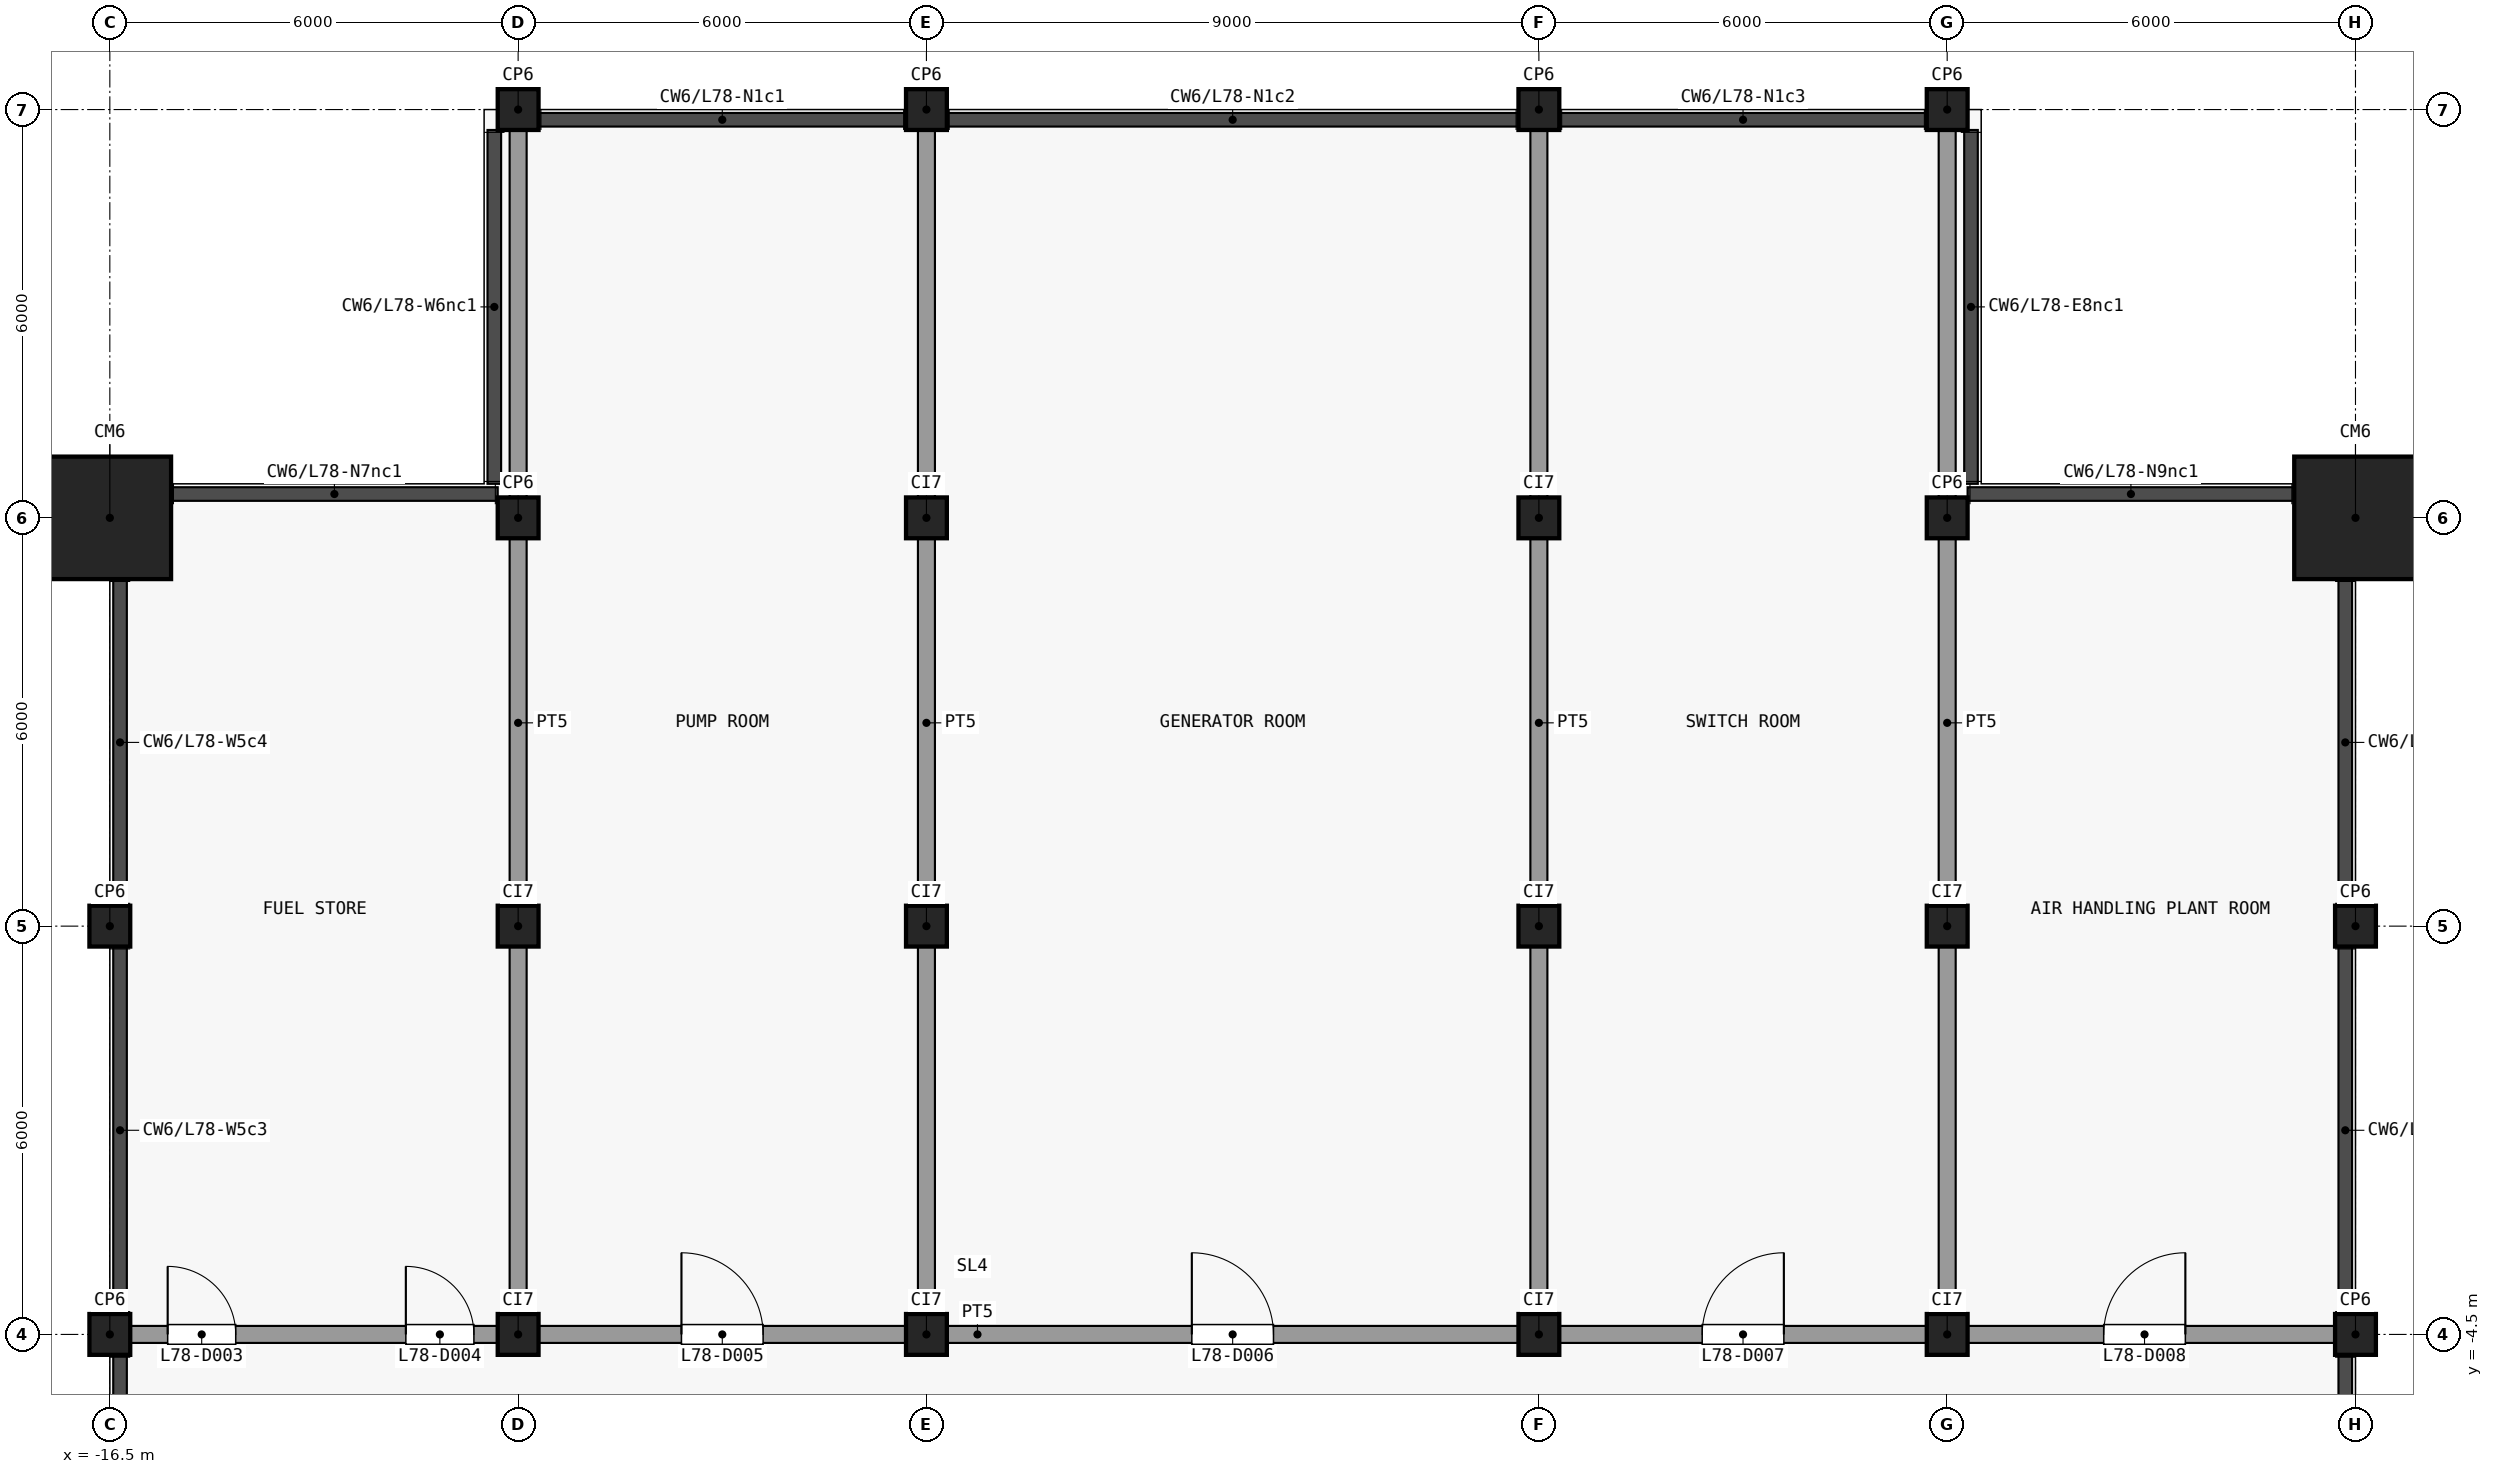
"""IFC4 building model, lengths in metres.
Left out: names, types, materials, properties, quantities, classifications, styles, units other than length and angle.
Written with IfcOpenShell. Run it as: python <this file> out.ifc"""

import sys

from ifc_helpers import new_model, si_unit, direction, frame, frame_2d, origin, origin_2d, place, context, subcontext, project, spatial, rectangle, extrude, element, fill, save


model = new_model("IFC4")
c1 = context("Model", 3, precision=1e-05, world=origin(), true_north=direction((0.0, 1.0)))
c2 = subcontext(c1, "Body", "Model", "MODEL_VIEW")
j1 = project(units=[si_unit("LENGTHUNIT", "METRE"), si_unit("PLANEANGLEUNIT", "RADIAN")], contexts=[c1])
p1 = place(None, origin())
s1 = spatial("IfcSite", under=j1, at=p1, CompositionType="ELEMENT")
p2 = place(p1, origin())
s2 = spatial("IfcBuilding", under=s1, at=p2, CompositionType="ELEMENT")
p3 = place(p2, frame((0.0, 0.0, 307.7)))
s3 = spatial("IfcBuildingStorey", under=s2, at=p3, CompositionType="ELEMENT", Elevation=307.7)
for number, where, z_axis, x_axis in (
    (1, (-16.5, -4.5, 0.0), (0.0, 0.0, 1.0), (1.0, 0.0, 0.0)),
    (2, (-16.5, 1.5, 0.0), (0.0, 0.0, 1.0), (1.0, 0.0, 0.0)),
):
    element("IfcColumn", number, at=place(p3, frame(where, z_axis=z_axis, x_axis=x_axis)), inside=s3, PredefinedType="COLUMN", context=c2, shape_type="SweptSolid", body=[
        extrude(rectangle(XDim=0.6, YDim=0.6, at=origin_2d()), origin(), (0.0, 0.0, 1.0), 4.5),
    ])
p4 = place(p3, frame((-16.5, 7.5, 0.0), z_axis=(0.0, 0.0, 1.0), x_axis=(1.0, 0.0, 0.0)))
e3 = element("IfcColumn", 3, at=p4, inside=s3, PredefinedType="COLUMN", context=c2, shape_type="SweptSolid", body=[
    extrude(rectangle(XDim=1.8, YDim=1.8, at=origin_2d()), origin(), (0.0, 0.0, 1.0), 4.5),
])
for number, where, z_axis, x_axis in (
    (4, (-10.5, -4.5, 0.0), (0.0, 0.0, 1.0), (1.0, 0.0, 0.0)),
    (5, (-10.5, 1.5, 0.0), (0.0, 0.0, 1.0), (1.0, 0.0, 0.0)),
    (6, (-10.5, 7.5, 0.0), (0.0, 0.0, 1.0), (1.0, 0.0, 0.0)),
    (7, (-10.5, 13.5, 0.0), (0.0, 0.0, 1.0), (1.0, 0.0, 0.0)),
    (8, (-4.5, -4.5, 0.0), (0.0, 0.0, 1.0), (1.0, 0.0, 0.0)),
    (9, (-4.5, 1.5, 0.0), (0.0, 0.0, 1.0), (1.0, 0.0, 0.0)),
    (10, (-4.5, 7.5, 0.0), (0.0, 0.0, 1.0), (1.0, 0.0, 0.0)),
    (11, (-4.5, 13.5, 0.0), (0.0, 0.0, 1.0), (1.0, 0.0, 0.0)),
    (12, (4.5, -4.5, 0.0), (0.0, 0.0, 1.0), (1.0, 0.0, 0.0)),
    (13, (4.5, 1.5, 0.0), (0.0, 0.0, 1.0), (1.0, 0.0, 0.0)),
    (14, (4.5, 7.5, 0.0), (0.0, 0.0, 1.0), (1.0, 0.0, 0.0)),
    (15, (4.5, 13.5, 0.0), (0.0, 0.0, 1.0), (1.0, 0.0, 0.0)),
    (16, (10.5, -4.5, 0.0), (0.0, 0.0, 1.0), (1.0, 0.0, 0.0)),
    (17, (10.5, 1.5, 0.0), (0.0, 0.0, 1.0), (1.0, 0.0, 0.0)),
    (18, (10.5, 7.5, 0.0), (0.0, 0.0, 1.0), (1.0, 0.0, 0.0)),
    (19, (10.5, 13.5, 0.0), (0.0, 0.0, 1.0), (1.0, 0.0, 0.0)),
    (20, (16.5, -4.5, 0.0), (0.0, 0.0, 1.0), (1.0, 0.0, 0.0)),
    (21, (16.5, 1.5, 0.0), (0.0, 0.0, 1.0), (1.0, 0.0, 0.0)),
):
    element("IfcColumn", number, at=place(p3, frame(where, z_axis=z_axis, x_axis=x_axis)), inside=s3, PredefinedType="COLUMN", context=c2, shape_type="SweptSolid", body=[
        extrude(rectangle(XDim=0.6, YDim=0.6, at=origin_2d()), origin(), (0.0, 0.0, 1.0), 4.5),
    ])
p5 = place(p3, frame((16.5, 7.5, 0.0), z_axis=(0.0, 0.0, 1.0), x_axis=(1.0, 0.0, 0.0)))
e22 = element("IfcColumn", 22, at=p5, inside=s3, PredefinedType="COLUMN", context=c2, shape_type="SweptSolid", body=[
    extrude(rectangle(XDim=1.8, YDim=1.8, at=origin_2d()), origin(), (0.0, 0.0, 1.0), 4.5),
])
p6 = place(p3, frame((-16.35, -4.5, 0.0), z_axis=(0.0, 0.0, 1.0), x_axis=(1.0, 0.0, 0.0)))
e23 = element("IfcWall", 23, at=p6, inside=s3, PredefinedType="PARTITIONING", context=c2, shape_type="SweptSolid", body=[
    extrude(rectangle(XDim=32.7, YDim=0.25, at=frame_2d((16.35, 0.0))), origin(), (0.0, 0.0, 1.0), 4.1),
])
p7 = place(p6, frame((0.7, 0.0, 0.0)))
e24 = element("IfcOpeningElement", 24, at=p7, cuts=e23, PredefinedType="OPENING", context=c2, shape_type="SweptSolid", body=[
    extrude(rectangle(XDim=1.0, YDim=2.1, at=frame_2d((0.5, 1.05))), frame((0.0, 0.135, 0.0), z_axis=(0.0, -1.0, 0.0), x_axis=(1.0, 0.0, 0.0)), (0.0, 0.0, 1.0), 0.27),
])
p8 = place(p6, frame((4.2, 0.0, 0.0)))
e25 = element("IfcOpeningElement", 25, at=p8, cuts=e23, PredefinedType="OPENING", context=c2, shape_type="SweptSolid", body=[
    extrude(rectangle(XDim=1.0, YDim=2.1, at=frame_2d((0.5, 1.05))), frame((0.0, 0.135, 0.0), z_axis=(0.0, -1.0, 0.0), x_axis=(1.0, 0.0, 0.0)), (0.0, 0.0, 1.0), 0.27),
])
p9 = place(p6, frame((8.25, 0.0, 0.0)))
e26 = element("IfcOpeningElement", 26, at=p9, cuts=e23, PredefinedType="OPENING", context=c2, shape_type="SweptSolid", body=[
    extrude(rectangle(XDim=1.2, YDim=2.1, at=frame_2d((0.6, 1.05))), frame((0.0, 0.135, 0.0), z_axis=(0.0, -1.0, 0.0), x_axis=(1.0, 0.0, 0.0)), (0.0, 0.0, 1.0), 0.27),
])
p10 = place(p6, frame((15.75, 0.0, 0.0)))
e27 = element("IfcOpeningElement", 27, at=p10, cuts=e23, PredefinedType="OPENING", context=c2, shape_type="SweptSolid", body=[
    extrude(rectangle(XDim=1.2, YDim=2.1, at=frame_2d((0.6, 1.05))), frame((0.0, 0.135, 0.0), z_axis=(0.0, -1.0, 0.0), x_axis=(1.0, 0.0, 0.0)), (0.0, 0.0, 1.0), 0.27),
])
p11 = place(p6, frame((23.25, 0.0, 0.0)))
e28 = element("IfcOpeningElement", 28, at=p11, cuts=e23, PredefinedType="OPENING", context=c2, shape_type="SweptSolid", body=[
    extrude(rectangle(XDim=1.2, YDim=2.1, at=frame_2d((0.6, 1.05))), frame((0.0, 0.135, 0.0), z_axis=(0.0, -1.0, 0.0), x_axis=(1.0, 0.0, 0.0)), (0.0, 0.0, 1.0), 0.27),
])
p12 = place(p6, frame((29.15, 0.0, 0.0)))
e29 = element("IfcOpeningElement", 29, at=p12, cuts=e23, PredefinedType="OPENING", context=c2, shape_type="SweptSolid", body=[
    extrude(rectangle(XDim=1.2, YDim=2.1, at=frame_2d((0.6, 1.05))), frame((0.0, 0.135, 0.0), z_axis=(0.0, -1.0, 0.0), x_axis=(1.0, 0.0, 0.0)), (0.0, 0.0, 1.0), 0.27),
])
for number, where, z_axis, x_axis in (
    (30, (-10.5, -4.375, 0.0), (0.0, 0.0, 1.0), (0.0, 1.0, 0.0)),
    (31, (-4.5, -4.375, 0.0), (0.0, 0.0, 1.0), (0.0, 1.0, 0.0)),
    (32, (4.5, -4.375, 0.0), (0.0, 0.0, 1.0), (0.0, 1.0, 0.0)),
    (33, (10.5, -4.375, 0.0), (0.0, 0.0, 1.0), (0.0, 1.0, 0.0)),
):
    element("IfcWall", number, at=place(p3, frame(where, z_axis=z_axis, x_axis=x_axis)), inside=s3, PredefinedType="PARTITIONING", context=c2, shape_type="SweptSolid", body=[
        extrude(rectangle(XDim=17.725, YDim=0.25, at=frame_2d((8.863, 0.0))), origin(), (0.0, 0.0, 1.0), 4.1),
    ])
p13 = place(p7, origin())
e34 = element("IfcDoor", 34, at=p13, inside=s3, OperationType="SINGLE_SWING_RIGHT", PredefinedType="DOOR", context=c2, shape_type="SweptSolid", body=[
    extrude(rectangle(XDim=1.0, YDim=2.1, at=frame_2d((0.5, 1.05))), frame((0.0, 0.025, 0.0), z_axis=(0.0, -1.0, 0.0), x_axis=(1.0, 0.0, 0.0)), (0.0, 0.0, 1.0), 0.05),
])
fill(e24, e34)
p14 = place(p8, origin())
e35 = element("IfcDoor", 35, at=p14, inside=s3, OperationType="SINGLE_SWING_RIGHT", PredefinedType="DOOR", context=c2, shape_type="SweptSolid", body=[
    extrude(rectangle(XDim=1.0, YDim=2.1, at=frame_2d((0.5, 1.05))), frame((0.0, 0.025, 0.0), z_axis=(0.0, -1.0, 0.0), x_axis=(1.0, 0.0, 0.0)), (0.0, 0.0, 1.0), 0.05),
])
fill(e25, e35)
p15 = place(p9, origin())
e36 = element("IfcDoor", 36, at=p15, inside=s3, OperationType="SINGLE_SWING_RIGHT", PredefinedType="DOOR", context=c2, shape_type="SweptSolid", body=[
    extrude(rectangle(XDim=1.2, YDim=2.1, at=frame_2d((0.6, 1.05))), frame((0.0, 0.025, 0.0), z_axis=(0.0, -1.0, 0.0), x_axis=(1.0, 0.0, 0.0)), (0.0, 0.0, 1.0), 0.05),
])
fill(e26, e36)
p16 = place(p10, origin())
e37 = element("IfcDoor", 37, at=p16, inside=s3, OperationType="SINGLE_SWING_RIGHT", PredefinedType="DOOR", context=c2, shape_type="SweptSolid", body=[
    extrude(rectangle(XDim=1.2, YDim=2.1, at=frame_2d((0.6, 1.05))), frame((0.0, 0.025, 0.0), z_axis=(0.0, -1.0, 0.0), x_axis=(1.0, 0.0, 0.0)), (0.0, 0.0, 1.0), 0.05),
])
fill(e27, e37)
p17 = place(p11, origin())
e38 = element("IfcDoor", 38, at=p17, inside=s3, OperationType="SINGLE_SWING_LEFT", PredefinedType="DOOR", context=c2, shape_type="SweptSolid", body=[
    extrude(rectangle(XDim=1.2, YDim=2.1, at=frame_2d((0.6, 1.05))), frame((0.0, 0.025, 0.0), z_axis=(0.0, -1.0, 0.0), x_axis=(1.0, 0.0, 0.0)), (0.0, 0.0, 1.0), 0.05),
])
fill(e28, e38)
p18 = place(p12, origin())
e39 = element("IfcDoor", 39, at=p18, inside=s3, OperationType="SINGLE_SWING_LEFT", PredefinedType="DOOR", context=c2, shape_type="SweptSolid", body=[
    extrude(rectangle(XDim=1.2, YDim=2.1, at=frame_2d((0.6, 1.05))), frame((0.0, 0.025, 0.0), z_axis=(0.0, -1.0, 0.0), x_axis=(1.0, 0.0, 0.0)), (0.0, 0.0, 1.0), 0.05),
])
fill(e29, e39)
save(model, sys.argv[1])
